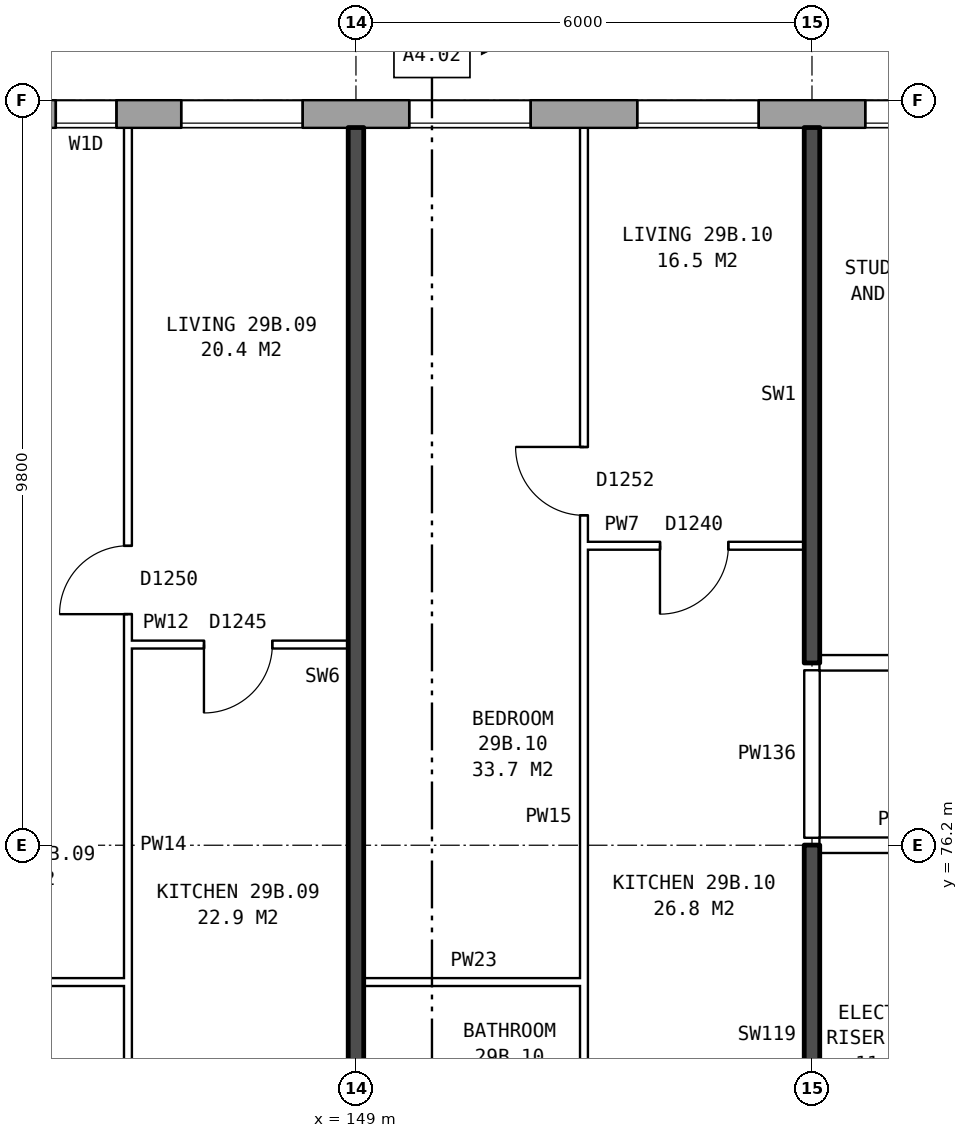
"""IFC4 building model, lengths in metres.
Left out: names, types, materials, properties, quantities, classifications, styles, units other than length and angle.
Written with IfcOpenShell. Run it as: python <this file> out.ifc"""

import sys

from ifc_helpers import new_model, si_unit, direction, frame, frame_2d, origin, place, context, subcontext, project, spatial, rectangle, extrude, element, fill, save


model = new_model("IFC4")
c1 = context("Model", 3, precision=1e-05, world=origin(), true_north=direction((0.0, 1.0)))
c2 = subcontext(c1, "Body", "Model", "MODEL_VIEW")
j1 = project(units=[si_unit("LENGTHUNIT", "METRE"), si_unit("PLANEANGLEUNIT", "RADIAN")], contexts=[c1])
p1 = place(None, origin())
s1 = spatial("IfcSite", under=j1, at=p1, CompositionType="ELEMENT")
p2 = place(p1, origin())
s2 = spatial("IfcBuilding", under=s1, at=p2, CompositionType="ELEMENT")
p3 = place(p2, frame((0.0, 0.0, 105.7)))
s3 = spatial("IfcBuildingStorey", under=s2, at=p3, CompositionType="ELEMENT", Elevation=105.7)
p4 = place(p3, frame((170.925, 85.82, 0.0), z_axis=(0.0, 0.0, 1.0), x_axis=(-1.0, 0.0, 0.0)))
e1 = element("IfcWall", 1, at=p4, inside=s3, PredefinedType="STANDARD", context=c2, shape_type="SweptSolid", body=[
    extrude(rectangle(XDim=36.851, YDim=0.36, at=frame_2d((18.425, 0.0))), origin(), (0.0, 0.0, 1.0), 2.85),
])
p5 = place(p4, frame((1.625, 0.0, 0.8)))
e2 = element("IfcOpeningElement", 2, at=p5, cuts=e1, PredefinedType="OPENING", context=c2, shape_type="SweptSolid", body=[
    extrude(rectangle(XDim=1.6, YDim=1.8, at=frame_2d((0.8, 0.9))), frame((0.0, 0.19, 0.0), z_axis=(0.0, -1.0, 0.0), x_axis=(1.0, 0.0, 0.0)), (0.0, 0.0, 1.0), 0.38),
])
p6 = place(p4, frame((4.625, 0.0, 0.8)))
e3 = element("IfcOpeningElement", 3, at=p6, cuts=e1, PredefinedType="OPENING", context=c2, shape_type="SweptSolid", body=[
    extrude(rectangle(XDim=1.6, YDim=1.8, at=frame_2d((0.8, 0.9))), frame((0.0, 0.19, 0.0), z_axis=(0.0, -1.0, 0.0), x_axis=(1.0, 0.0, 0.0)), (0.0, 0.0, 1.0), 0.38),
])
p7 = place(p4, frame((6.525, 0.0, 0.8)))
e4 = element("IfcOpeningElement", 4, at=p7, cuts=e1, PredefinedType="OPENING", context=c2, shape_type="SweptSolid", body=[
    extrude(rectangle(XDim=1.4, YDim=1.8, at=frame_2d((0.7, 0.9))), frame((0.0, 0.19, 0.0), z_axis=(0.0, -1.0, 0.0), x_axis=(1.0, 0.0, 0.0)), (0.0, 0.0, 1.0), 0.38),
])
p8 = place(p4, frame((10.675, 0.0, 0.8)))
e5 = element("IfcOpeningElement", 5, at=p8, cuts=e1, PredefinedType="OPENING", context=c2, shape_type="SweptSolid", body=[
    extrude(rectangle(XDim=0.6, YDim=0.9, at=frame_2d((0.3, 0.45))), frame((0.0, 0.19, 0.0), z_axis=(0.0, -1.0, 0.0), x_axis=(1.0, 0.0, 0.0)), (0.0, 0.0, 1.0), 0.38),
])
p9 = place(p4, frame((13.625, 0.0, 0.8)))
e6 = element("IfcOpeningElement", 6, at=p9, cuts=e1, PredefinedType="OPENING", context=c2, shape_type="SweptSolid", body=[
    extrude(rectangle(XDim=1.6, YDim=1.8, at=frame_2d((0.8, 0.9))), frame((0.0, 0.19, 0.0), z_axis=(0.0, -1.0, 0.0), x_axis=(1.0, 0.0, 0.0)), (0.0, 0.0, 1.0), 0.38),
])
p10 = place(p4, frame((16.625, 0.0, 0.8)))
e7 = element("IfcOpeningElement", 7, at=p10, cuts=e1, PredefinedType="OPENING", context=c2, shape_type="SweptSolid", body=[
    extrude(rectangle(XDim=1.6, YDim=1.8, at=frame_2d((0.8, 0.9))), frame((0.0, 0.19, 0.0), z_axis=(0.0, -1.0, 0.0), x_axis=(1.0, 0.0, 0.0)), (0.0, 0.0, 1.0), 0.38),
])
p11 = place(p4, frame((19.625, 0.0, 0.8)))
e8 = element("IfcOpeningElement", 8, at=p11, cuts=e1, PredefinedType="OPENING", context=c2, shape_type="SweptSolid", body=[
    extrude(rectangle(XDim=1.6, YDim=1.8, at=frame_2d((0.8, 0.9))), frame((0.0, 0.19, 0.0), z_axis=(0.0, -1.0, 0.0), x_axis=(1.0, 0.0, 0.0)), (0.0, 0.0, 1.0), 0.38),
])
p12 = place(p4, frame((22.625, 0.0, 0.8)))
e9 = element("IfcOpeningElement", 9, at=p12, cuts=e1, PredefinedType="OPENING", context=c2, shape_type="SweptSolid", body=[
    extrude(rectangle(XDim=1.6, YDim=1.8, at=frame_2d((0.8, 0.9))), frame((0.0, 0.19, 0.0), z_axis=(0.0, -1.0, 0.0), x_axis=(1.0, 0.0, 0.0)), (0.0, 0.0, 1.0), 0.38),
])
p13 = place(p4, frame((25.075, 0.0, 0.15)))
e10 = element("IfcOpeningElement", 10, at=p13, cuts=e1, PredefinedType="OPENING", context=c2, shape_type="SweptSolid", body=[
    extrude(rectangle(XDim=0.8, YDim=1.8, at=frame_2d((0.4, 0.9))), frame((0.0, 0.19, 0.0), z_axis=(0.0, -1.0, 0.0), x_axis=(1.0, 0.0, 0.0)), (0.0, 0.0, 1.0), 0.38),
])
p14 = place(p4, frame((28.625, 0.0, 0.8)))
e11 = element("IfcOpeningElement", 11, at=p14, cuts=e1, PredefinedType="OPENING", context=c2, shape_type="SweptSolid", body=[
    extrude(rectangle(XDim=1.6, YDim=1.8, at=frame_2d((0.8, 0.9))), frame((0.0, 0.19, 0.0), z_axis=(0.0, -1.0, 0.0), x_axis=(1.0, 0.0, 0.0)), (0.0, 0.0, 1.0), 0.38),
])
p15 = place(p4, frame((31.625, 0.0, 0.8)))
e12 = element("IfcOpeningElement", 12, at=p15, cuts=e1, PredefinedType="OPENING", context=c2, shape_type="SweptSolid", body=[
    extrude(rectangle(XDim=1.6, YDim=1.8, at=frame_2d((0.8, 0.9))), frame((0.0, 0.19, 0.0), z_axis=(0.0, -1.0, 0.0), x_axis=(1.0, 0.0, 0.0)), (0.0, 0.0, 1.0), 0.38),
])
p16 = place(p4, frame((34.625, 0.0, 0.8)))
e13 = element("IfcOpeningElement", 13, at=p16, cuts=e1, PredefinedType="OPENING", context=c2, shape_type="SweptSolid", body=[
    extrude(rectangle(XDim=1.6, YDim=1.8, at=frame_2d((0.8, 0.9))), frame((0.0, 0.19, 0.0), z_axis=(0.0, -1.0, 0.0), x_axis=(1.0, 0.0, 0.0)), (0.0, 0.0, 1.0), 0.38),
])
p17 = place(p4, frame((8.225, 0.0, 1.4)))
e14 = element("IfcOpeningElement", 14, at=p17, cuts=e1, PredefinedType="OPENING", context=c2, shape_type="SweptSolid", body=[
    extrude(rectangle(XDim=1.0, YDim=1.2, at=frame_2d((0.5, 0.6))), frame((0.0, 0.19, 0.0), z_axis=(0.0, -1.0, 0.0), x_axis=(1.0, 0.0, 0.0)), (0.0, 0.0, 1.0), 0.38),
])
p18 = place(p4, frame((11.725, 0.0, 0.8)))
e15 = element("IfcOpeningElement", 15, at=p18, cuts=e1, PredefinedType="OPENING", context=c2, shape_type="SweptSolid", body=[
    extrude(rectangle(XDim=1.6, YDim=1.8, at=frame_2d((0.8, 0.9))), frame((0.0, 0.19, 0.0), z_axis=(0.0, -1.0, 0.0), x_axis=(1.0, 0.0, 0.0)), (0.0, 0.0, 1.0), 0.38),
])
p19 = place(p4, frame((26.175, 0.0, 0.25)))
e16 = element("IfcOpeningElement", 16, at=p19, cuts=e1, PredefinedType="OPENING", context=c2, shape_type="SweptSolid", body=[
    extrude(rectangle(XDim=0.6, YDim=0.9, at=frame_2d((0.3, 0.45))), frame((0.0, 0.19, 0.0), z_axis=(0.0, -1.0, 0.0), x_axis=(1.0, 0.0, 0.0)), (0.0, 0.0, 1.0), 0.38),
])
p20 = place(p3, frame((142.76, 74.4, 0.0), z_axis=(0.0, 0.0, 1.0), x_axis=(1.0, 0.0, 0.0)))
e17 = element("IfcWall", 17, at=p20, inside=s3, PredefinedType="PARTITIONING", context=c2, shape_type="SweptSolid", body=[
    extrude(rectangle(XDim=3.24, YDim=0.1, at=frame_2d((1.62, 0.0))), origin(), (0.0, 0.0, 1.0), 2.85),
])
p21 = place(p3, frame((149.1, 74.4, 0.0), z_axis=(0.0, 0.0, 1.0), x_axis=(1.0, 0.0, 0.0)))
e18 = element("IfcWall", 18, at=p21, inside=s3, PredefinedType="PARTITIONING", context=c2, shape_type="SweptSolid", body=[
    extrude(rectangle(XDim=2.9, YDim=0.1, at=frame_2d((1.45, 0.0))), origin(), (0.0, 0.0, 1.0), 2.85),
])
p22 = place(p3, frame((155.1, 76.2, 0.0), z_axis=(0.0, 0.0, 1.0), x_axis=(1.0, 0.0, 0.0)))
e19 = element("IfcWall", 19, at=p22, inside=s3, PredefinedType="PARTITIONING", context=c2, shape_type="SweptSolid", body=[
    extrude(rectangle(XDim=2.14, YDim=0.2, at=frame_2d((1.07, 0.0))), origin(), (0.0, 0.0, 1.0), 2.85),
])
p23 = place(p3, frame((155.1, 78.6, 0.0), z_axis=(0.0, 0.0, 1.0), x_axis=(1.0, 0.0, 0.0)))
e20 = element("IfcWall", 20, at=p23, inside=s3, PredefinedType="PARTITIONING", context=c2, shape_type="SweptSolid", body=[
    extrude(rectangle(XDim=18.54, YDim=0.2, at=frame_2d((9.27, 0.0))), origin(), (0.0, 0.0, 1.0), 2.85),
])
p24 = place(p23, frame((1.45, 0.0, 0.0)))
e21 = element("IfcOpeningElement", 21, at=p24, cuts=e20, PredefinedType="OPENING", context=c2, shape_type="SweptSolid", body=[
    extrude(rectangle(XDim=1.0, YDim=2.1, at=frame_2d((0.5, 1.05))), frame((0.0, 0.11, 0.0), z_axis=(0.0, -1.0, 0.0), x_axis=(1.0, 0.0, 0.0)), (0.0, 0.0, 1.0), 0.22),
])
p25 = place(p23, frame((9.6, 0.0, 0.0)))
e22 = element("IfcOpeningElement", 22, at=p25, cuts=e20, PredefinedType="OPENING", context=c2, shape_type="SweptSolid", body=[
    extrude(rectangle(XDim=1.0, YDim=2.1, at=frame_2d((0.5, 1.05))), frame((0.0, 0.11, 0.0), z_axis=(0.0, -1.0, 0.0), x_axis=(1.0, 0.0, 0.0)), (0.0, 0.0, 1.0), 0.22),
])
p26 = place(p23, frame((15.92, 0.0, 0.0)))
e23 = element("IfcOpeningElement", 23, at=p26, cuts=e20, PredefinedType="OPENING", context=c2, shape_type="SweptSolid", body=[
    extrude(rectangle(XDim=1.0, YDim=2.1, at=frame_2d((0.5, 1.05))), frame((0.0, 0.11, 0.0), z_axis=(0.0, -1.0, 0.0), x_axis=(1.0, 0.0, 0.0)), (0.0, 0.0, 1.0), 0.22),
])
p27 = place(p3, frame((146.0, 78.84, 0.0), z_axis=(0.0, 0.0, 1.0), x_axis=(1.0, 0.0, 0.0)))
e24 = element("IfcWall", 24, at=p27, inside=s3, PredefinedType="PARTITIONING", context=c2, shape_type="SweptSolid", body=[
    extrude(rectangle(XDim=2.9, YDim=0.1, at=frame_2d((1.45, 0.0))), origin(), (0.0, 0.0, 1.0), 2.85),
])
p28 = place(p27, frame((1.0, 0.0, 0.0)))
e25 = element("IfcOpeningElement", 25, at=p28, cuts=e24, PredefinedType="OPENING", context=c2, shape_type="SweptSolid", body=[
    extrude(rectangle(XDim=0.9, YDim=2.1, at=frame_2d((0.45, 1.05))), frame((0.0, 0.06, 0.0), z_axis=(0.0, -1.0, 0.0), x_axis=(1.0, 0.0, 0.0)), (0.0, 0.0, 1.0), 0.12),
])
p29 = place(p3, frame((152.0, 80.14, 0.0), z_axis=(0.0, 0.0, 1.0), x_axis=(1.0, 0.0, 0.0)))
e26 = element("IfcWall", 26, at=p29, inside=s3, PredefinedType="PARTITIONING", context=c2, shape_type="SweptSolid", body=[
    extrude(rectangle(XDim=2.9, YDim=0.1, at=frame_2d((1.45, 0.0))), origin(), (0.0, 0.0, 1.0), 2.85),
])
p30 = place(p29, frame((1.0, 0.0, 0.0)))
e27 = element("IfcOpeningElement", 27, at=p30, cuts=e26, PredefinedType="OPENING", context=c2, shape_type="SweptSolid", body=[
    extrude(rectangle(XDim=0.9, YDim=2.1, at=frame_2d((0.45, 1.05))), frame((0.0, 0.06, 0.0), z_axis=(0.0, -1.0, 0.0), x_axis=(1.0, 0.0, 0.0)), (0.0, 0.0, 1.0), 0.12),
])
p31 = place(p3, frame((146.0, 71.3, 0.0), z_axis=(0.0, 0.0, 1.0), x_axis=(0.0, 1.0, 0.0)))
e28 = element("IfcWall", 28, at=p31, inside=s3, PredefinedType="PARTITIONING", context=c2, shape_type="SweptSolid", body=[
    extrude(rectangle(XDim=14.34, YDim=0.1, at=frame_2d((7.17, 0.0))), origin(), (0.0, 0.0, 1.0), 2.85),
])
p32 = place(p31, frame((7.94, 0.0, 0.0)))
e29 = element("IfcOpeningElement", 29, at=p32, cuts=e28, PredefinedType="OPENING", context=c2, shape_type="SweptSolid", body=[
    extrude(rectangle(XDim=0.9, YDim=2.1, at=frame_2d((0.45, 1.05))), frame((0.0, 0.06, 0.0), z_axis=(0.0, -1.0, 0.0), x_axis=(1.0, 0.0, 0.0)), (0.0, 0.0, 1.0), 0.12),
])
p33 = place(p31, frame((0.4, 0.0, 0.0)))
e30 = element("IfcOpeningElement", 30, at=p33, cuts=e28, PredefinedType="OPENING", context=c2, shape_type="SweptSolid", body=[
    extrude(rectangle(XDim=0.9, YDim=2.1, at=frame_2d((0.45, 1.05))), frame((0.0, 0.06, 0.0), z_axis=(0.0, -1.0, 0.0), x_axis=(1.0, 0.0, 0.0)), (0.0, 0.0, 1.0), 0.12),
])
p34 = place(p3, frame((149.0, 71.2, 0.0), z_axis=(0.0, 0.0, 1.0), x_axis=(0.0, 1.0, 0.0)))
e31 = element("IfcWall", 31, at=p34, inside=s3, PredefinedType="SOLIDWALL", context=c2, shape_type="SweptSolid", body=[
    extrude(rectangle(XDim=14.44, YDim=0.2, at=frame_2d((7.22, 0.0))), origin(), (0.0, 0.0, 1.0), 2.85),
])
p35 = place(p3, frame((152.0, 71.3, 0.0), z_axis=(0.0, 0.0, 1.0), x_axis=(0.0, 1.0, 0.0)))
e32 = element("IfcWall", 32, at=p35, inside=s3, PredefinedType="PARTITIONING", context=c2, shape_type="SweptSolid", body=[
    extrude(rectangle(XDim=14.34, YDim=0.1, at=frame_2d((7.17, 0.0))), origin(), (0.0, 0.0, 1.0), 2.85),
])
p36 = place(p35, frame((9.24, 0.0, 0.0)))
e33 = element("IfcOpeningElement", 33, at=p36, cuts=e32, PredefinedType="OPENING", context=c2, shape_type="SweptSolid", body=[
    extrude(rectangle(XDim=0.9, YDim=2.1, at=frame_2d((0.45, 1.05))), frame((0.0, 0.06, 0.0), z_axis=(0.0, -1.0, 0.0), x_axis=(1.0, 0.0, 0.0)), (0.0, 0.0, 1.0), 0.12),
])
p37 = place(p35, frame((0.4, 0.0, 0.0)))
e34 = element("IfcOpeningElement", 34, at=p37, cuts=e32, PredefinedType="OPENING", context=c2, shape_type="SweptSolid", body=[
    extrude(rectangle(XDim=0.9, YDim=2.1, at=frame_2d((0.45, 1.05))), frame((0.0, 0.06, 0.0), z_axis=(0.0, -1.0, 0.0), x_axis=(1.0, 0.0, 0.0)), (0.0, 0.0, 1.0), 0.12),
])
p38 = place(p3, frame((155.0, 71.2, 0.0), z_axis=(0.0, 0.0, 1.0), x_axis=(0.0, 1.0, 0.0)))
e35 = element("IfcWall", 35, at=p38, inside=s3, PredefinedType="SOLIDWALL", context=c2, shape_type="SweptSolid", body=[
    extrude(rectangle(XDim=5.0, YDim=0.2, at=frame_2d((2.5, 0.0))), origin(), (0.0, 0.0, 1.0), 2.85),
])
p39 = place(p3, frame((155.0, 76.3, 0.0), z_axis=(0.0, 0.0, 1.0), x_axis=(0.0, 1.0, 0.0)))
e36 = element("IfcWall", 36, at=p39, inside=s3, PredefinedType="PARTITIONING", context=c2, shape_type="SweptSolid", body=[
    extrude(rectangle(XDim=2.2, YDim=0.2, at=frame_2d((1.1, 0.0))), origin(), (0.0, 0.0, 1.0), 2.85),
])
p40 = place(p3, frame((155.0, 78.6, 0.0), z_axis=(0.0, 0.0, 1.0), x_axis=(0.0, 1.0, 0.0)))
e37 = element("IfcWall", 37, at=p40, inside=s3, PredefinedType="SOLIDWALL", context=c2, shape_type="SweptSolid", body=[
    extrude(rectangle(XDim=7.04, YDim=0.2, at=frame_2d((3.52, 0.0))), origin(), (0.0, 0.0, 1.0), 2.85),
])
p41 = place(p9, origin())
e38 = element("IfcWindow", 38, at=p41, inside=s3, PartitioningType="SINGLE_PANEL", PredefinedType="WINDOW", context=c2, shape_type="SweptSolid", body=[
    extrude(rectangle(XDim=1.6, YDim=1.8, at=frame_2d((0.8, 0.9))), frame((0.0, 0.15, 0.0), z_axis=(0.0, -1.0, 0.0), x_axis=(1.0, 0.0, 0.0)), (0.0, 0.0, 1.0), 0.06),
])
fill(e6, e38)
p42 = place(p10, origin())
e39 = element("IfcWindow", 39, at=p42, inside=s3, PartitioningType="SINGLE_PANEL", PredefinedType="WINDOW", context=c2, shape_type="SweptSolid", body=[
    extrude(rectangle(XDim=1.6, YDim=1.8, at=frame_2d((0.8, 0.9))), frame((0.0, 0.15, 0.0), z_axis=(0.0, -1.0, 0.0), x_axis=(1.0, 0.0, 0.0)), (0.0, 0.0, 1.0), 0.06),
])
fill(e7, e39)
p43 = place(p11, origin())
e40 = element("IfcWindow", 40, at=p43, inside=s3, PartitioningType="SINGLE_PANEL", PredefinedType="WINDOW", context=c2, shape_type="SweptSolid", body=[
    extrude(rectangle(XDim=1.6, YDim=1.8, at=frame_2d((0.8, 0.9))), frame((0.0, 0.15, 0.0), z_axis=(0.0, -1.0, 0.0), x_axis=(1.0, 0.0, 0.0)), (0.0, 0.0, 1.0), 0.06),
])
fill(e8, e40)
p44 = place(p12, origin())
e41 = element("IfcWindow", 41, at=p44, inside=s3, PartitioningType="SINGLE_PANEL", PredefinedType="WINDOW", context=c2, shape_type="SweptSolid", body=[
    extrude(rectangle(XDim=1.6, YDim=1.8, at=frame_2d((0.8, 0.9))), frame((0.0, 0.15, 0.0), z_axis=(0.0, -1.0, 0.0), x_axis=(1.0, 0.0, 0.0)), (0.0, 0.0, 1.0), 0.06),
])
fill(e9, e41)
p45 = place(p13, origin())
e42 = element("IfcWindow", 42, at=p45, inside=s3, PartitioningType="SINGLE_PANEL", PredefinedType="WINDOW", context=c2, shape_type="SweptSolid", body=[
    extrude(rectangle(XDim=0.8, YDim=1.8, at=frame_2d((0.4, 0.9))), frame((0.0, 0.15, 0.0), z_axis=(0.0, -1.0, 0.0), x_axis=(1.0, 0.0, 0.0)), (0.0, 0.0, 1.0), 0.06),
])
fill(e10, e42)
p46 = place(p32, origin())
e43 = element("IfcDoor", 43, at=p46, inside=s3, OperationType="SINGLE_SWING_LEFT", PredefinedType="DOOR", context=c2, shape_type="SweptSolid", body=[
    extrude(rectangle(XDim=0.9, YDim=2.1, at=frame_2d((0.45, 1.05))), frame((0.0, 0.025, 0.0), z_axis=(0.0, -1.0, 0.0), x_axis=(1.0, 0.0, 0.0)), (0.0, 0.0, 1.0), 0.05),
])
fill(e29, e43)
p47 = place(p28, frame((0.9, 0.0, 0.0), z_axis=(0.0, 0.0, 1.0), x_axis=(-1.0, 0.0, 0.0)))
e44 = element("IfcDoor", 44, at=p47, inside=s3, OperationType="SINGLE_SWING_RIGHT", PredefinedType="DOOR", context=c2, shape_type="SweptSolid", body=[
    extrude(rectangle(XDim=0.9, YDim=2.1, at=frame_2d((0.45, 1.05))), frame((0.0, 0.025, 0.0), z_axis=(0.0, -1.0, 0.0), x_axis=(1.0, 0.0, 0.0)), (0.0, 0.0, 1.0), 0.05),
])
fill(e25, e44)
p48 = place(p36, origin())
e45 = element("IfcDoor", 45, at=p48, inside=s3, OperationType="SINGLE_SWING_RIGHT", PredefinedType="DOOR", context=c2, shape_type="SweptSolid", body=[
    extrude(rectangle(XDim=0.9, YDim=2.1, at=frame_2d((0.45, 1.05))), frame((0.0, 0.025, 0.0), z_axis=(0.0, -1.0, 0.0), x_axis=(1.0, 0.0, 0.0)), (0.0, 0.0, 1.0), 0.05),
])
fill(e33, e45)
p49 = place(p30, frame((0.9, 0.0, 0.0), z_axis=(0.0, 0.0, 1.0), x_axis=(-1.0, 0.0, 0.0)))
e46 = element("IfcDoor", 46, at=p49, inside=s3, OperationType="SINGLE_SWING_RIGHT", PredefinedType="DOOR", context=c2, shape_type="SweptSolid", body=[
    extrude(rectangle(XDim=0.9, YDim=2.1, at=frame_2d((0.45, 1.05))), frame((0.0, 0.025, 0.0), z_axis=(0.0, -1.0, 0.0), x_axis=(1.0, 0.0, 0.0)), (0.0, 0.0, 1.0), 0.05),
])
fill(e27, e46)
save(model, sys.argv[1])
